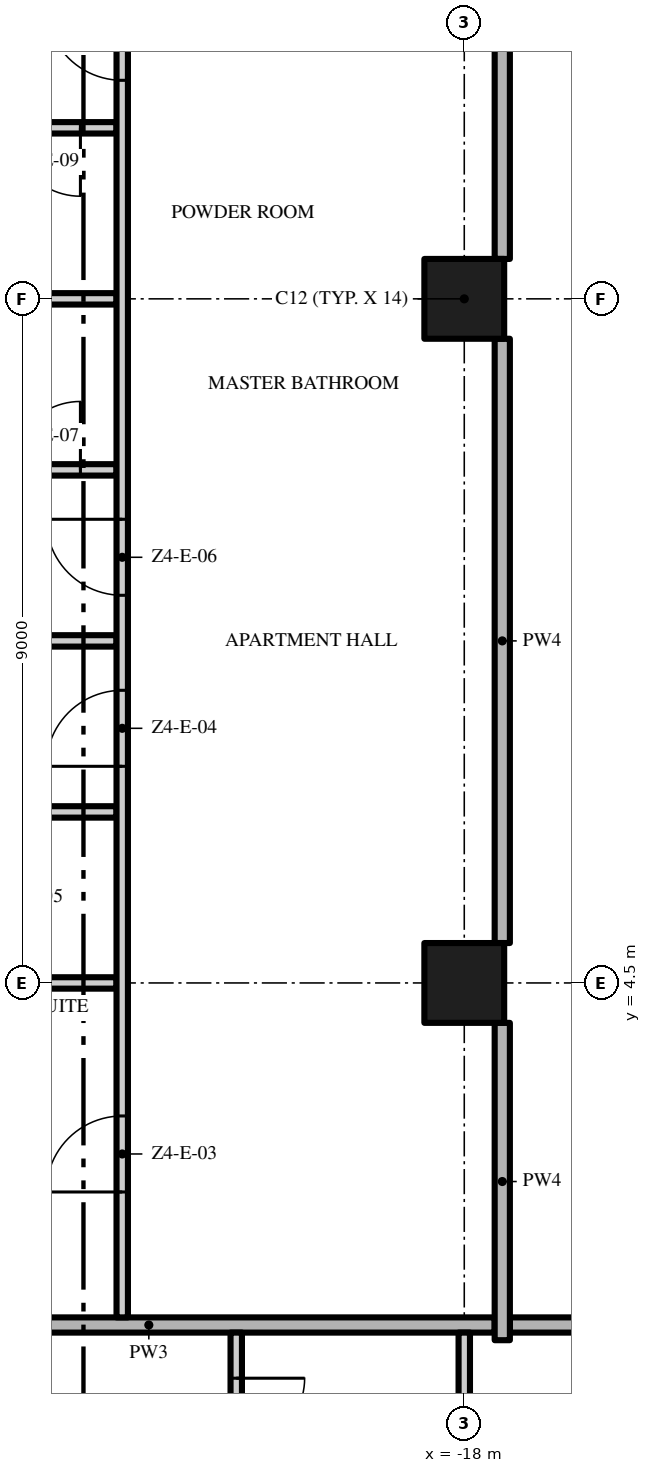
"""IFC4 building model, lengths in metres.
Left out: names, types, materials, properties, quantities, classifications, styles, units other than length and angle.
Written with IfcOpenShell. Run it as: python <this file> out.ifc"""

import sys

from ifc_helpers import new_model, si_unit, direction, frame, frame_2d, origin, origin_2d, place, context, subcontext, project, spatial, rectangle, extrude, element, fill, save


model = new_model("IFC4")
c1 = context("Model", 3, precision=1e-05, world=origin(), true_north=direction((0.0, 1.0)))
c2 = subcontext(c1, "Body", "Model", "MODEL_VIEW")
j1 = project(units=[si_unit("LENGTHUNIT", "METRE"), si_unit("PLANEANGLEUNIT", "RADIAN")], contexts=[c1])
p1 = place(None, origin())
s1 = spatial("IfcSite", under=j1, at=p1, CompositionType="ELEMENT")
p2 = place(p1, origin())
s2 = spatial("IfcBuilding", under=s1, at=p2, CompositionType="ELEMENT")
p3 = place(p2, frame((0.0, 0.0, 230.0)))
s3 = spatial("IfcBuildingStorey", under=s2, at=p3, CompositionType="ELEMENT", Elevation=230.0)
for number, where, z_axis, x_axis in (
    (1, (-18.0, 13.5, 0.0), (0.0, 0.0, 1.0), (1.0, 0.0, 0.0)),
    (2, (-18.0, 4.5, 0.0), (0.0, 0.0, 1.0), (1.0, 0.0, 0.0)),
):
    element("IfcColumn", number, at=place(p3, frame(where, z_axis=z_axis, x_axis=x_axis)), inside=s3, PredefinedType="COLUMN", context=c2, shape_type="SweptSolid", body=[
        extrude(rectangle(XDim=1.05, YDim=1.05, at=origin_2d()), origin(), (0.0, 0.0, 1.0), 3.5),
    ])
p4 = place(p3, frame((-17.4, 0.0, 0.0), z_axis=(0.0, 0.0, 1.0), x_axis=(1.0, 0.0, 0.0)))
e3 = element("IfcWall", 3, at=p4, inside=s3, PredefinedType="PARTITIONING", context=c2, shape_type="SweptSolid", body=[
    extrude(rectangle(XDim=12.8, YDim=0.2, at=frame_2d((6.4, 0.0))), origin(), (0.0, 0.0, 1.0), 3.5),
])
p5 = place(p3, frame((-26.7, 0.0, 0.0), z_axis=(0.0, 0.0, 1.0), x_axis=(1.0, 0.0, 0.0)))
e4 = element("IfcWall", 4, at=p5, inside=s3, PredefinedType="PARTITIONING", context=c2, shape_type="SweptSolid", body=[
    extrude(rectangle(XDim=9.1, YDim=0.2, at=frame_2d((4.55, 0.0))), origin(), (0.0, 0.0, 1.0), 3.5),
])
p6 = place(p3, frame((-26.05, 4.5, 0.0), z_axis=(0.0, 0.0, 1.0), x_axis=(1.0, 0.0, 0.0)))
e5 = element("IfcWall", 5, at=p6, inside=s3, PredefinedType="PARTITIONING", context=c2, shape_type="SweptSolid", body=[
    extrude(rectangle(XDim=3.475, YDim=0.15, at=frame_2d((1.738, 0.0))), origin(), (0.0, 0.0, 1.0), 3.5),
])
p7 = place(p3, frame((-24.45, 6.75, 0.0), z_axis=(0.0, 0.0, 1.0), x_axis=(1.0, 0.0, 0.0)))
e6 = element("IfcWall", 6, at=p7, inside=s3, PredefinedType="PARTITIONING", context=c2, shape_type="SweptSolid", body=[
    extrude(rectangle(XDim=1.875, YDim=0.15, at=frame_2d((0.938, 0.0))), origin(), (0.0, 0.0, 1.0), 3.5),
])
p8 = place(p3, frame((-26.7, 9.0, 0.0), z_axis=(0.0, 0.0, 1.0), x_axis=(1.0, 0.0, 0.0)))
e7 = element("IfcWall", 7, at=p8, inside=s3, PredefinedType="PARTITIONING", context=c2, shape_type="SweptSolid", body=[
    extrude(rectangle(XDim=4.125, YDim=0.15, at=frame_2d((2.062, 0.0))), origin(), (0.0, 0.0, 1.0), 3.5),
])
p9 = place(p3, frame((-24.45, 11.25, 0.0), z_axis=(0.0, 0.0, 1.0), x_axis=(1.0, 0.0, 0.0)))
e8 = element("IfcWall", 8, at=p9, inside=s3, PredefinedType="PARTITIONING", context=c2, shape_type="SweptSolid", body=[
    extrude(rectangle(XDim=1.875, YDim=0.15, at=frame_2d((0.938, 0.0))), origin(), (0.0, 0.0, 1.0), 3.5),
])
p10 = place(p9, frame((0.5, 0.0, 0.0)))
e9 = element("IfcOpeningElement", 9, at=p10, cuts=e8, PredefinedType="OPENING", context=c2, shape_type="SweptSolid", body=[
    extrude(rectangle(XDim=0.9, YDim=2.1, at=frame_2d((0.45, 1.05))), frame((0.0, 0.085, 0.0), z_axis=(0.0, -1.0, 0.0), x_axis=(1.0, 0.0, 0.0)), (0.0, 0.0, 1.0), 0.17),
])
p11 = place(p3, frame((-24.45, 13.5, 0.0), z_axis=(0.0, 0.0, 1.0), x_axis=(1.0, 0.0, 0.0)))
e10 = element("IfcWall", 10, at=p11, inside=s3, PredefinedType="PARTITIONING", context=c2, shape_type="SweptSolid", body=[
    extrude(rectangle(XDim=1.875, YDim=0.15, at=frame_2d((0.938, 0.0))), origin(), (0.0, 0.0, 1.0), 3.5),
])
p12 = place(p3, frame((-22.575, 15.75, 0.0), z_axis=(0.0, 0.0, 1.0), x_axis=(-1.0, 0.0, 0.0)))
e11 = element("IfcWall", 11, at=p12, inside=s3, PredefinedType="PARTITIONING", context=c2, shape_type="SweptSolid", body=[
    extrude(rectangle(XDim=1.875, YDim=0.15, at=frame_2d((0.938, 0.0))), origin(), (0.0, 0.0, 1.0), 3.5),
])
p13 = place(p12, frame((0.475, 0.0, 0.0)))
e12 = element("IfcOpeningElement", 12, at=p13, cuts=e11, PredefinedType="OPENING", context=c2, shape_type="SweptSolid", body=[
    extrude(rectangle(XDim=0.9, YDim=2.1, at=frame_2d((0.45, 1.05))), frame((0.0, 0.085, 0.0), z_axis=(0.0, -1.0, 0.0), x_axis=(1.0, 0.0, 0.0)), (0.0, 0.0, 1.0), 0.17),
])
p14 = place(p3, frame((-22.5, 0.1, 0.0), z_axis=(0.0, 0.0, 1.0), x_axis=(0.0, 1.0, 0.0)))
e13 = element("IfcWall", 13, at=p14, inside=s3, PredefinedType="PARTITIONING", context=c2, shape_type="SweptSolid", body=[
    extrude(rectangle(XDim=17.425, YDim=0.15, at=frame_2d((8.713, 0.0))), origin(), (0.0, 0.0, 1.0), 3.5),
])
p15 = place(p14, frame((1.65, 0.0, 0.0)))
e14 = element("IfcOpeningElement", 14, at=p15, cuts=e13, PredefinedType="OPENING", context=c2, shape_type="SweptSolid", body=[
    extrude(rectangle(XDim=1.0, YDim=2.4, at=frame_2d((0.5, 1.2))), frame((0.0, 0.085, 0.0), z_axis=(0.0, -1.0, 0.0), x_axis=(1.0, 0.0, 0.0)), (0.0, 0.0, 1.0), 0.17),
])
p16 = place(p14, frame((7.25, 0.0, 0.0)))
e15 = element("IfcOpeningElement", 15, at=p16, cuts=e13, PredefinedType="OPENING", context=c2, shape_type="SweptSolid", body=[
    extrude(rectangle(XDim=1.0, YDim=2.4, at=frame_2d((0.5, 1.2))), frame((0.0, 0.085, 0.0), z_axis=(0.0, -1.0, 0.0), x_axis=(1.0, 0.0, 0.0)), (0.0, 0.0, 1.0), 0.17),
])
p17 = place(p14, frame((9.5, 0.0, 0.0)))
e16 = element("IfcOpeningElement", 16, at=p17, cuts=e13, PredefinedType="OPENING", context=c2, shape_type="SweptSolid", body=[
    extrude(rectangle(XDim=1.0, YDim=2.4, at=frame_2d((0.5, 1.2))), frame((0.0, 0.085, 0.0), z_axis=(0.0, -1.0, 0.0), x_axis=(1.0, 0.0, 0.0)), (0.0, 0.0, 1.0), 0.17),
])
p18 = place(p14, frame((16.275, 0.0, 0.0)))
e17 = element("IfcOpeningElement", 17, at=p18, cuts=e13, PredefinedType="OPENING", context=c2, shape_type="SweptSolid", body=[
    extrude(rectangle(XDim=1.0, YDim=2.4, at=frame_2d((0.5, 1.2))), frame((0.0, 0.085, 0.0), z_axis=(0.0, -1.0, 0.0), x_axis=(1.0, 0.0, 0.0)), (0.0, 0.0, 1.0), 0.17),
])
p19 = place(p3, frame((-21.0, -0.1, 0.0), z_axis=(0.0, 0.0, 1.0), x_axis=(0.0, -1.0, 0.0)))
e18 = element("IfcWall", 18, at=p19, inside=s3, PredefinedType="PARTITIONING", context=c2, shape_type="SweptSolid", body=[
    extrude(rectangle(XDim=2.225, YDim=0.15, at=frame_2d((1.113, 0.0))), origin(), (0.0, 0.0, 1.0), 3.5),
])
p20 = place(p19, frame((0.6, 0.0, 0.0)))
e19 = element("IfcOpeningElement", 19, at=p20, cuts=e18, PredefinedType="OPENING", context=c2, shape_type="SweptSolid", body=[
    extrude(rectangle(XDim=0.9, YDim=2.1, at=frame_2d((0.45, 1.05))), frame((0.0, 0.085, 0.0), z_axis=(0.0, -1.0, 0.0), x_axis=(1.0, 0.0, 0.0)), (0.0, 0.0, 1.0), 0.17),
])
p21 = place(p3, frame((-18.0, -3.975, 0.0), z_axis=(0.0, 0.0, 1.0), x_axis=(0.0, 1.0, 0.0)))
e20 = element("IfcWall", 20, at=p21, inside=s3, PredefinedType="PARTITIONING", context=c2, shape_type="SweptSolid", body=[
    extrude(rectangle(XDim=3.875, YDim=0.15, at=frame_2d((1.938, 0.0))), origin(), (0.0, 0.0, 1.0), 3.5),
])
p22 = place(p21, frame((0.15, 0.0, 0.0)))
e21 = element("IfcOpeningElement", 21, at=p22, cuts=e20, PredefinedType="OPENING", context=c2, shape_type="SweptSolid", body=[
    extrude(rectangle(XDim=1.0, YDim=2.4, at=frame_2d((0.5, 1.2))), frame((0.0, 0.085, 0.0), z_axis=(0.0, -1.0, 0.0), x_axis=(1.0, 0.0, 0.0)), (0.0, 0.0, 1.0), 0.17),
])
p23 = place(p3, frame((-17.5, -0.2, 0.0), z_axis=(0.0, 0.0, 1.0), x_axis=(0.0, 1.0, 0.0)))
e22 = element("IfcWall", 22, at=p23, inside=s3, PredefinedType="PARTITIONING", context=c2, shape_type="SweptSolid", body=[
    extrude(rectangle(XDim=4.175, YDim=0.2, at=frame_2d((2.087, 0.0))), origin(), (0.0, 0.0, 1.0), 3.5),
])
p24 = place(p3, frame((-17.5, 5.025, 0.0), z_axis=(0.0, 0.0, 1.0), x_axis=(0.0, 1.0, 0.0)))
e23 = element("IfcWall", 23, at=p24, inside=s3, PredefinedType="PARTITIONING", context=c2, shape_type="SweptSolid", body=[
    extrude(rectangle(XDim=7.95, YDim=0.2, at=frame_2d((3.975, 0.0))), origin(), (0.0, 0.0, 1.0), 3.5),
])
p25 = place(p3, frame((-17.5, 14.025, 0.0), z_axis=(0.0, 0.0, 1.0), x_axis=(0.0, 1.0, 0.0)))
e24 = element("IfcWall", 24, at=p25, inside=s3, PredefinedType="PARTITIONING", context=c2, shape_type="SweptSolid", body=[
    extrude(rectangle(XDim=7.525, YDim=0.2, at=frame_2d((3.763, 0.0))), origin(), (0.0, 0.0, 1.0), 3.5),
])
p26 = place(p25, frame((3.375, 0.0, 0.0)))
e25 = element("IfcOpeningElement", 25, at=p26, cuts=e24, PredefinedType="OPENING", context=c2, shape_type="SweptSolid", body=[
    extrude(rectangle(XDim=1.2, YDim=2.4, at=frame_2d((0.6, 1.2))), frame((0.0, 0.11, 0.0), z_axis=(0.0, -1.0, 0.0), x_axis=(1.0, 0.0, 0.0)), (0.0, 0.0, 1.0), 0.22),
])
p27 = place(p15, origin())
e26 = element("IfcDoor", 26, at=p27, inside=s3, OperationType="SINGLE_SWING_LEFT", PredefinedType="DOOR", context=c2, shape_type="SweptSolid", body=[
    extrude(rectangle(XDim=1.0, YDim=2.4, at=frame_2d((0.5, 1.2))), frame((0.0, 0.025, 0.0), z_axis=(0.0, -1.0, 0.0), x_axis=(1.0, 0.0, 0.0)), (0.0, 0.0, 1.0), 0.05),
])
fill(e14, e26)
p28 = place(p16, origin())
e27 = element("IfcDoor", 27, at=p28, inside=s3, OperationType="SINGLE_SWING_LEFT", PredefinedType="DOOR", context=c2, shape_type="SweptSolid", body=[
    extrude(rectangle(XDim=1.0, YDim=2.4, at=frame_2d((0.5, 1.2))), frame((0.0, 0.025, 0.0), z_axis=(0.0, -1.0, 0.0), x_axis=(1.0, 0.0, 0.0)), (0.0, 0.0, 1.0), 0.05),
])
fill(e15, e27)
p29 = place(p17, origin())
e28 = element("IfcDoor", 28, at=p29, inside=s3, OperationType="SINGLE_SWING_RIGHT", PredefinedType="DOOR", context=c2, shape_type="SweptSolid", body=[
    extrude(rectangle(XDim=1.0, YDim=2.4, at=frame_2d((0.5, 1.2))), frame((0.0, 0.025, 0.0), z_axis=(0.0, -1.0, 0.0), x_axis=(1.0, 0.0, 0.0)), (0.0, 0.0, 1.0), 0.05),
])
fill(e16, e28)
p30 = place(p10, origin())
e29 = element("IfcDoor", 29, at=p30, inside=s3, OperationType="SINGLE_SWING_RIGHT", PredefinedType="DOOR", context=c2, shape_type="SweptSolid", body=[
    extrude(rectangle(XDim=0.9, YDim=2.1, at=frame_2d((0.45, 1.05))), frame((0.0, 0.025, 0.0), z_axis=(0.0, -1.0, 0.0), x_axis=(1.0, 0.0, 0.0)), (0.0, 0.0, 1.0), 0.05),
])
fill(e9, e29)
p31 = place(p18, origin())
e30 = element("IfcDoor", 30, at=p31, inside=s3, OperationType="SINGLE_SWING_RIGHT", PredefinedType="DOOR", context=c2, shape_type="SweptSolid", body=[
    extrude(rectangle(XDim=1.0, YDim=2.4, at=frame_2d((0.5, 1.2))), frame((0.0, 0.025, 0.0), z_axis=(0.0, -1.0, 0.0), x_axis=(1.0, 0.0, 0.0)), (0.0, 0.0, 1.0), 0.05),
])
fill(e17, e30)
p32 = place(p13, origin())
e31 = element("IfcDoor", 31, at=p32, inside=s3, OperationType="SINGLE_SWING_LEFT", PredefinedType="DOOR", context=c2, shape_type="SweptSolid", body=[
    extrude(rectangle(XDim=0.9, YDim=2.1, at=frame_2d((0.45, 1.05))), frame((0.0, 0.025, 0.0), z_axis=(0.0, -1.0, 0.0), x_axis=(1.0, 0.0, 0.0)), (0.0, 0.0, 1.0), 0.05),
])
fill(e12, e31)
p33 = place(p20, origin())
e32 = element("IfcDoor", 32, at=p33, inside=s3, OperationType="SINGLE_SWING_LEFT", PredefinedType="DOOR", context=c2, shape_type="SweptSolid", body=[
    extrude(rectangle(XDim=0.9, YDim=2.1, at=frame_2d((0.45, 1.05))), frame((0.0, 0.025, 0.0), z_axis=(0.0, -1.0, 0.0), x_axis=(1.0, 0.0, 0.0)), (0.0, 0.0, 1.0), 0.05),
])
fill(e19, e32)
save(model, sys.argv[1])
